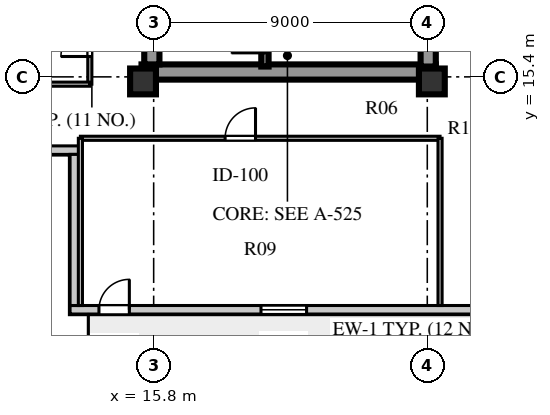
"""IFC4 building model, lengths in metres.
Left out: names, types, materials, properties, quantities, classifications, styles, units other than length and angle.
Written with IfcOpenShell. Run it as: python <this file> out.ifc"""

import sys

from ifc_helpers import new_model, si_unit, direction, frame, frame_2d, origin, origin_2d, place, context, subcontext, project, spatial, rectangle, extrude, element, fill, save


model = new_model("IFC4")
c1 = context("Model", 3, precision=1e-05, world=origin(), true_north=direction((0.0, 1.0)))
c2 = subcontext(c1, "Body", "Model", "MODEL_VIEW")
j1 = project(units=[si_unit("LENGTHUNIT", "METRE"), si_unit("PLANEANGLEUNIT", "RADIAN")], contexts=[c1])
p1 = place(None, origin())
s1 = spatial("IfcSite", under=j1, at=p1, CompositionType="ELEMENT")
p2 = place(p1, origin())
s2 = spatial("IfcBuilding", under=s1, at=p2, CompositionType="ELEMENT")
p3 = place(p2, frame((0.0, 0.0, 188.7)))
s3 = spatial("IfcBuildingStorey", under=s2, at=p3, CompositionType="ELEMENT", Elevation=188.7)
p4 = place(p3, frame((15.4, 15.56, 0.0), z_axis=(0.0, 0.0, 1.0), x_axis=(1.0, 0.0, 0.0)))
e1 = element("IfcWall", 1, at=p4, inside=s3, PredefinedType="SHEAR", context=c2, shape_type="SweptSolid", body=[
    extrude(rectangle(XDim=9.68, YDim=0.5, at=frame_2d((4.84, 0.0))), origin(), (0.0, 0.0, 1.0), 3.6),
])
p5 = place(p3, frame((15.74, 15.81, 0.0), z_axis=(0.0, 0.0, 1.0), x_axis=(0.0, 1.0, 0.0)))
e2 = element("IfcWall", 2, at=p5, inside=s3, PredefinedType="SHEAR", context=c2, shape_type="SweptSolid", body=[
    extrude(rectangle(XDim=25.63, YDim=0.5, at=frame_2d((12.815, 0.0))), origin(), (0.0, 0.0, 1.0), 3.6),
])
p6 = place(p3, frame((24.83, 15.74, 0.0), z_axis=(0.0, 0.0, 1.0), x_axis=(0.0, 1.0, 0.0)))
e3 = element("IfcWall", 3, at=p6, inside=s3, PredefinedType="SHEAR", context=c2, shape_type="SweptSolid", body=[
    extrude(rectangle(XDim=25.76, YDim=0.5, at=frame_2d((12.88, 0.0))), origin(), (0.0, 0.0, 1.0), 3.6),
])
p7 = place(p6, frame((1.61, 0.0, 0.0)))
e4 = element("IfcOpeningElement", 4, at=p7, cuts=e3, PredefinedType="OPENING", context=c2, shape_type="SweptSolid", body=[
    extrude(rectangle(XDim=1.2, YDim=2.1, at=frame_2d((0.6, 1.05))), frame((0.0, 0.26, 0.0), z_axis=(0.0, -1.0, 0.0), x_axis=(1.0, 0.0, 0.0)), (0.0, 0.0, 1.0), 0.52),
])
p8 = place(p6, frame((6.78, 0.0, 0.0)))
e5 = element("IfcOpeningElement", 5, at=p8, cuts=e3, PredefinedType="OPENING", context=c2, shape_type="SweptSolid", body=[
    extrude(rectangle(XDim=0.85, YDim=2.06, at=frame_2d((0.425, 1.03))), frame((0.0, 0.26, 0.0), z_axis=(0.0, -1.0, 0.0), x_axis=(1.0, 0.0, 0.0)), (0.0, 0.0, 1.0), 0.52),
])
p9 = place(p6, frame((12.11, 0.0, 0.0)))
e6 = element("IfcOpeningElement", 6, at=p9, cuts=e3, PredefinedType="OPENING", context=c2, shape_type="SweptSolid", body=[
    extrude(rectangle(XDim=1.5, YDim=2.12, at=frame_2d((0.75, 1.06))), frame((0.0, 0.26, 0.0), z_axis=(0.0, -1.0, 0.0), x_axis=(1.0, 0.0, 0.0)), (0.0, 0.0, 1.0), 0.52),
])
p10 = place(p6, frame((20.11, 0.0, 0.0)))
e7 = element("IfcOpeningElement", 7, at=p10, cuts=e3, PredefinedType="OPENING", context=c2, shape_type="SweptSolid", body=[
    extrude(rectangle(XDim=1.2, YDim=2.12, at=frame_2d((0.6, 1.06))), frame((0.0, 0.26, 0.0), z_axis=(0.0, -1.0, 0.0), x_axis=(1.0, 0.0, 0.0)), (0.0, 0.0, 1.0), 0.52),
])
p11 = place(p6, frame((24.01, 0.0, 0.0)))
e8 = element("IfcOpeningElement", 8, at=p11, cuts=e3, PredefinedType="OPENING", context=c2, shape_type="SweptSolid", body=[
    extrude(rectangle(XDim=0.95, YDim=2.1, at=frame_2d((0.475, 1.05))), frame((0.0, 0.26, 0.0), z_axis=(0.0, -1.0, 0.0), x_axis=(1.0, 0.0, 0.0)), (0.0, 0.0, 1.0), 0.52),
])
for number, where, z_axis, x_axis in (
    (9, (15.45, 15.25, 0.0), (0.0, 0.0, 1.0), (1.0, 0.0, 0.0)),
    (10, (24.95, 15.25, 0.0), (0.0, 0.0, 1.0), (1.0, 0.0, 0.0)),
):
    element("IfcColumn", number, at=place(p3, frame(where, z_axis=z_axis, x_axis=x_axis)), inside=s3, PredefinedType="COLUMN", context=c2, shape_type="SweptSolid", body=[
        extrude(rectangle(XDim=0.85, YDim=0.85, at=origin_2d()), origin(), (0.0, 0.0, 1.0), 3.6),
    ])
p12 = place(p3, frame((13.05, 7.74, 0.0), z_axis=(0.0, 0.0, 1.0), x_axis=(1.0, 0.0, 0.0)))
e11 = element("IfcWall", 11, at=p12, inside=s3, PredefinedType="STANDARD", context=c2, shape_type="SweptSolid", body=[
    extrude(rectangle(XDim=32.5, YDim=0.28, at=frame_2d((16.25, 0.0))), origin(), (0.0, 0.0, 1.0), 3.6),
])
p13 = place(p12, frame((0.95, 0.0, 0.0)))
e12 = element("IfcOpeningElement", 12, at=p13, cuts=e11, PredefinedType="OPENING", context=c2, shape_type="SweptSolid", body=[
    extrude(rectangle(XDim=1.0, YDim=2.05, at=frame_2d((0.5, 1.025))), frame((0.0, 0.15, 0.0), z_axis=(0.0, -1.0, 0.0), x_axis=(1.0, 0.0, 0.0)), (0.0, 0.0, 1.0), 0.3),
])
p14 = place(p12, frame((6.28, 0.0, 0.8)))
e13 = element("IfcOpeningElement", 13, at=p14, cuts=e11, PredefinedType="OPENING", context=c2, shape_type="SweptSolid", body=[
    extrude(rectangle(XDim=1.5, YDim=2.0, at=frame_2d((0.75, 1.0))), frame((0.0, 0.15, 0.0), z_axis=(0.0, -1.0, 0.0), x_axis=(1.0, 0.0, 0.0)), (0.0, 0.0, 1.0), 0.3),
])
p15 = place(p12, frame((14.895, 0.0, 0.8)))
e14 = element("IfcOpeningElement", 14, at=p15, cuts=e11, PredefinedType="OPENING", context=c2, shape_type="SweptSolid", body=[
    extrude(rectangle(XDim=1.2, YDim=1.75, at=frame_2d((0.6, 0.875))), frame((0.0, 0.15, 0.0), z_axis=(0.0, -1.0, 0.0), x_axis=(1.0, 0.0, 0.0)), (0.0, 0.0, 1.0), 0.3),
])
p16 = place(p12, frame((19.285, 0.0, 0.8)))
e15 = element("IfcOpeningElement", 15, at=p16, cuts=e11, PredefinedType="OPENING", context=c2, shape_type="SweptSolid", body=[
    extrude(rectangle(XDim=1.2, YDim=1.75, at=frame_2d((0.6, 0.875))), frame((0.0, 0.15, 0.0), z_axis=(0.0, -1.0, 0.0), x_axis=(1.0, 0.0, 0.0)), (0.0, 0.0, 1.0), 0.3),
])
p17 = place(p12, frame((22.205, 0.0, 0.8)))
e16 = element("IfcOpeningElement", 16, at=p17, cuts=e11, PredefinedType="OPENING", context=c2, shape_type="SweptSolid", body=[
    extrude(rectangle(XDim=2.1, YDim=1.95, at=frame_2d((1.05, 0.975))), frame((0.0, 0.15, 0.0), z_axis=(0.0, -1.0, 0.0), x_axis=(1.0, 0.0, 0.0)), (0.0, 0.0, 1.0), 0.3),
])
p18 = place(p12, frame((26.065, 0.0, 0.8)))
e17 = element("IfcOpeningElement", 17, at=p18, cuts=e11, PredefinedType="OPENING", context=c2, shape_type="SweptSolid", body=[
    extrude(rectangle(XDim=1.2, YDim=1.75, at=frame_2d((0.6, 0.875))), frame((0.0, 0.15, 0.0), z_axis=(0.0, -1.0, 0.0), x_axis=(1.0, 0.0, 0.0)), (0.0, 0.0, 1.0), 0.3),
])
p19 = place(p12, frame((29.255, 0.0, 0.8)))
e18 = element("IfcOpeningElement", 18, at=p19, cuts=e11, PredefinedType="OPENING", context=c2, shape_type="SweptSolid", body=[
    extrude(rectangle(XDim=1.65, YDim=1.95, at=frame_2d((0.825, 0.975))), frame((0.0, 0.15, 0.0), z_axis=(0.0, -1.0, 0.0), x_axis=(1.0, 0.0, 0.0)), (0.0, 0.0, 1.0), 0.3),
])
p20 = place(p3, frame((7.8, 12.99, 0.0), z_axis=(0.0, 0.0, 1.0), x_axis=(1.0, 0.0, 0.0)))
e19 = element("IfcWall", 19, at=p20, inside=s3, PredefinedType="STANDARD", context=c2, shape_type="SweptSolid", body=[
    extrude(rectangle(XDim=5.53, YDim=0.28, at=frame_2d((2.765, 0.0))), origin(), (0.0, 0.0, 1.0), 3.6),
])
p21 = place(p3, frame((13.19, 12.85, 0.0), z_axis=(0.0, 0.0, 1.0), x_axis=(0.0, -1.0, 0.0)))
e20 = element("IfcWall", 20, at=p21, inside=s3, PredefinedType="STANDARD", context=c2, shape_type="SweptSolid", body=[
    extrude(rectangle(XDim=4.97, YDim=0.28, at=frame_2d((2.485, 0.0))), origin(), (0.0, 0.0, 1.0), 3.6),
])
p22 = place(p3, frame((19.46, 15.74, 0.0), z_axis=(0.0, 0.0, 1.0), x_axis=(0.0, 1.0, 0.0)))
e21 = element("IfcWall", 21, at=p22, inside=s3, PredefinedType="SHEAR", context=c2, shape_type="SweptSolid", body=[
    extrude(rectangle(XDim=8.2, YDim=0.24, at=frame_2d((4.1, 0.0))), origin(), (0.0, 0.0, 1.0), 3.85),
])
p23 = place(p22, frame((0.45, 0.0, 0.0)))
e22 = element("IfcOpeningElement", 22, at=p23, cuts=e21, PredefinedType="OPENING", context=c2, shape_type="SweptSolid", body=[
    extrude(rectangle(XDim=1.1, YDim=2.1, at=frame_2d((0.55, 1.05))), frame((0.0, 0.13, 0.0), z_axis=(0.0, -1.0, 0.0), x_axis=(1.0, 0.0, 0.0)), (0.0, 0.0, 1.0), 0.26),
])
p24 = place(p3, frame((13.7, 15.16, 0.0), z_axis=(0.0, 0.0, 1.0), x_axis=(0.0, 1.0, 0.0)))
e23 = element("IfcWall", 23, at=p24, inside=s3, PredefinedType="PARTITIONING", context=c2, shape_type="SweptSolid", body=[
    extrude(rectangle(XDim=26.88, YDim=0.135, at=frame_2d((13.44, 0.0))), origin(), (0.0, 0.0, 1.0), 3.6),
])
p25 = place(p24, frame((0.91, 0.0, 0.0)))
e24 = element("IfcOpeningElement", 24, at=p25, cuts=e23, PredefinedType="OPENING", context=c2, shape_type="SweptSolid", body=[
    extrude(rectangle(XDim=0.95, YDim=2.1, at=frame_2d((0.475, 1.05))), frame((0.0, 0.078, 0.0), z_axis=(0.0, -1.0, 0.0), x_axis=(1.0, 0.0, 0.0)), (0.0, 0.0, 1.0), 0.155),
])
p26 = place(p3, frame((8.08, 15.16, 0.0), z_axis=(0.0, 0.0, 1.0), x_axis=(1.0, 0.0, 0.0)))
e25 = element("IfcWall", 25, at=p26, inside=s3, PredefinedType="PARTITIONING", context=c2, shape_type="SweptSolid", body=[
    extrude(rectangle(XDim=5.62, YDim=0.135, at=frame_2d((2.81, 0.0))), origin(), (0.0, 0.0, 1.0), 3.15),
])
p27 = place(p3, frame((13.39, 13.38, 0.0), z_axis=(0.0, 0.0, 1.0), x_axis=(1.0, 0.0, 0.0)))
e26 = element("IfcWall", 26, at=p27, inside=s3, PredefinedType="PARTITIONING", context=c2, shape_type="SweptSolid", body=[
    extrude(rectangle(XDim=11.83, YDim=0.135, at=frame_2d((5.915, 0.0))), origin(), (0.0, 0.0, 1.0), 3.6),
])
p28 = place(p27, frame((4.76, 0.0, 0.0)))
e27 = element("IfcOpeningElement", 27, at=p28, cuts=e26, PredefinedType="OPENING", context=c2, shape_type="SweptSolid", body=[
    extrude(rectangle(XDim=1.0, YDim=2.08, at=frame_2d((0.5, 1.04))), frame((0.0, 0.078, 0.0), z_axis=(0.0, -1.0, 0.0), x_axis=(1.0, 0.0, 0.0)), (0.0, 0.0, 1.0), 0.155),
])
p29 = place(p3, frame((13.39, 7.88, 0.0), z_axis=(0.0, 0.0, 1.0), x_axis=(0.0, 1.0, 0.0)))
e28 = element("IfcWall", 28, at=p29, inside=s3, PredefinedType="PARTITIONING", context=c2, shape_type="SweptSolid", body=[
    extrude(rectangle(XDim=5.5, YDim=0.135, at=frame_2d((2.75, 0.0))), origin(), (0.0, 0.0, 1.0), 3.6),
])
p30 = place(p3, frame((25.22, 7.88, 0.0), z_axis=(0.0, 0.0, 1.0), x_axis=(0.0, 1.0, 0.0)))
e29 = element("IfcWall", 29, at=p30, inside=s3, PredefinedType="PARTITIONING", context=c2, shape_type="SweptSolid", body=[
    extrude(rectangle(XDim=5.5, YDim=0.135, at=frame_2d((2.75, 0.0))), origin(), (0.0, 0.0, 1.0), 3.15),
])
p31 = place(p13, frame((1.0, 0.0, 0.0), z_axis=(0.0, 0.0, 1.0), x_axis=(-1.0, 0.0, 0.0)))
e30 = element("IfcDoor", 30, at=p31, inside=s3, OperationType="SINGLE_SWING_LEFT", PredefinedType="DOOR", context=c2, shape_type="SweptSolid", body=[
    extrude(rectangle(XDim=1.0, YDim=2.05, at=frame_2d((0.5, 1.025))), frame((0.0, 0.025, 0.0), z_axis=(0.0, -1.0, 0.0), x_axis=(1.0, 0.0, 0.0)), (0.0, 0.0, 1.0), 0.05),
])
fill(e12, e30)
p32 = place(p14, origin())
e31 = element("IfcWindow", 31, at=p32, inside=s3, PartitioningType="SINGLE_PANEL", PredefinedType="WINDOW", context=c2, shape_type="SweptSolid", body=[
    extrude(rectangle(XDim=1.5, YDim=2.0, at=frame_2d((0.75, 1.0))), frame((0.0, 0.03, 0.0), z_axis=(0.0, -1.0, 0.0), x_axis=(1.0, 0.0, 0.0)), (0.0, 0.0, 1.0), 0.06),
])
fill(e13, e31)
p33 = place(p23, origin())
e32 = element("IfcDoor", 32, at=p33, inside=s3, OperationType="SINGLE_SWING_LEFT", PredefinedType="DOOR", context=c2, shape_type="SweptSolid", body=[
    extrude(rectangle(XDim=1.1, YDim=2.1, at=frame_2d((0.55, 1.05))), frame((0.0, 0.025, 0.0), z_axis=(0.0, -1.0, 0.0), x_axis=(1.0, 0.0, 0.0)), (0.0, 0.0, 1.0), 0.05),
])
fill(e22, e32)
p34 = place(p28, frame((1.0, 0.0, 0.0), z_axis=(0.0, 0.0, 1.0), x_axis=(-1.0, 0.0, 0.0)))
e33 = element("IfcDoor", 33, at=p34, inside=s3, OperationType="SINGLE_SWING_LEFT", PredefinedType="DOOR", context=c2, shape_type="SweptSolid", body=[
    extrude(rectangle(XDim=1.0, YDim=2.08, at=frame_2d((0.5, 1.04))), frame((0.0, 0.025, 0.0), z_axis=(0.0, -1.0, 0.0), x_axis=(1.0, 0.0, 0.0)), (0.0, 0.0, 1.0), 0.05),
])
fill(e27, e33)
p35 = place(p25, origin())
e34 = element("IfcDoor", 34, at=p35, inside=s3, OperationType="SINGLE_SWING_LEFT", PredefinedType="DOOR", context=c2, shape_type="SweptSolid", body=[
    extrude(rectangle(XDim=0.95, YDim=2.1, at=frame_2d((0.475, 1.05))), frame((0.0, 0.025, 0.0), z_axis=(0.0, -1.0, 0.0), x_axis=(1.0, 0.0, 0.0)), (0.0, 0.0, 1.0), 0.05),
])
fill(e24, e34)
save(model, sys.argv[1])
